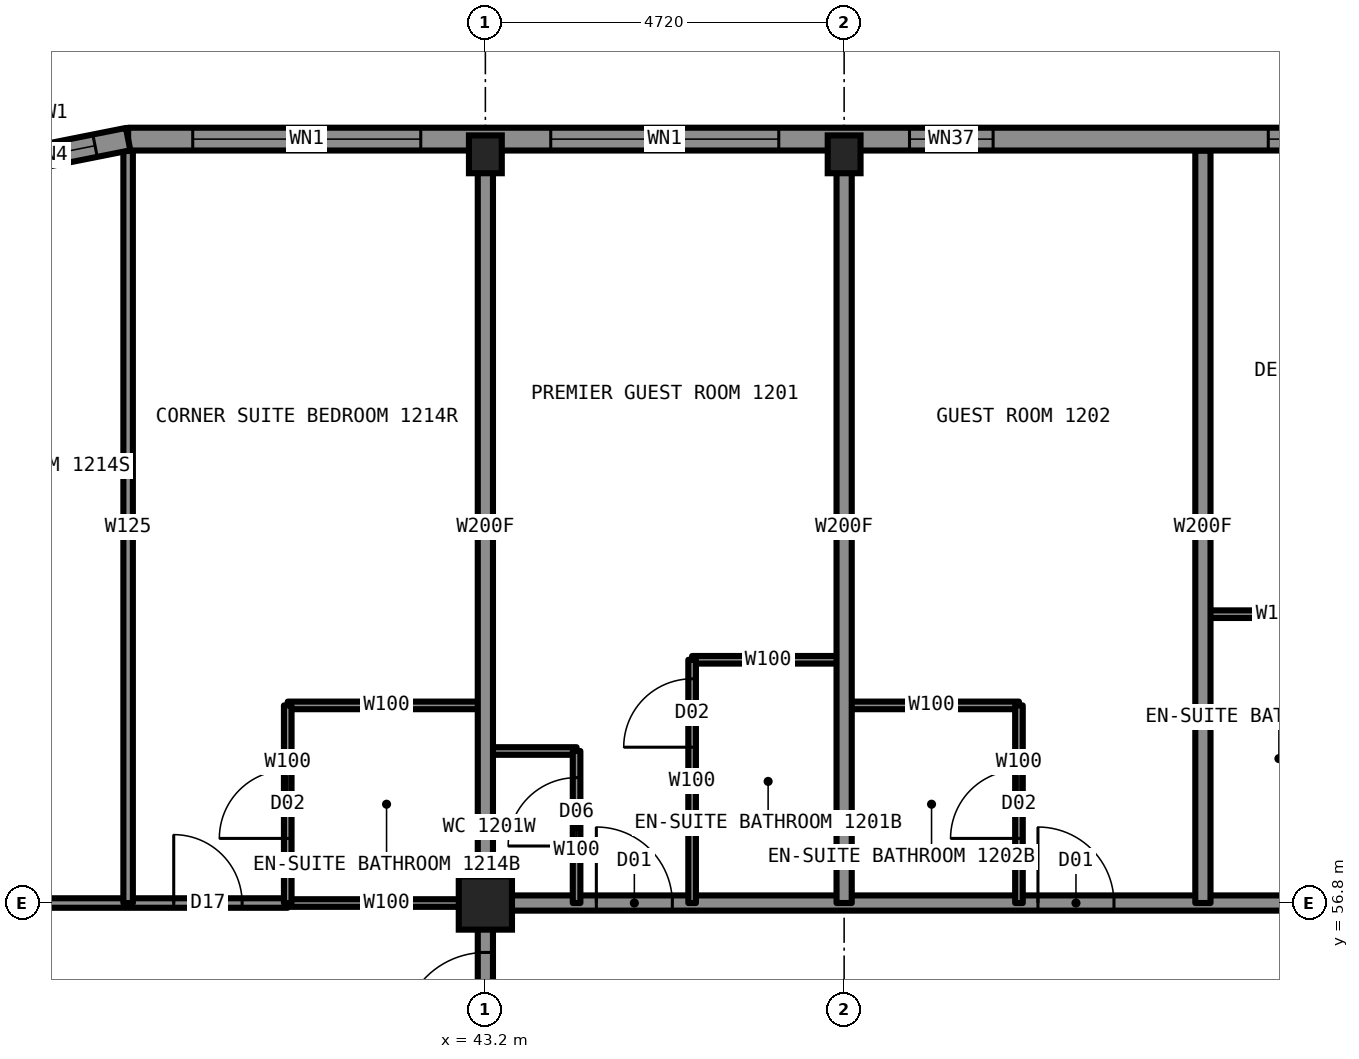
"""IFC4 building model, lengths in metres.
Left out: names, types, materials, properties, quantities, classifications, styles, units other than length and angle.
Written with IfcOpenShell. Run it as: python <this file> out.ifc"""

import sys

from ifc_helpers import new_model, si_unit, direction, frame, frame_2d, origin, origin_2d, place, context, subcontext, project, spatial, rectangle, hollow_rectangle, i_section, extrude, element, fill, save


model = new_model("IFC4")
c1 = context("Model", 3, precision=1e-05, world=origin(), true_north=direction((0.0, 1.0)))
c2 = subcontext(c1, "Body", "Model", "MODEL_VIEW")
j1 = project(units=[si_unit("LENGTHUNIT", "METRE"), si_unit("PLANEANGLEUNIT", "RADIAN")], contexts=[c1])
p1 = place(None, origin())
s1 = spatial("IfcSite", under=j1, at=p1, CompositionType="ELEMENT")
p2 = place(p1, origin())
s2 = spatial("IfcBuilding", under=s1, at=p2, CompositionType="ELEMENT")
p3 = place(p2, frame((0.0, 0.0, 49.5)))
s3 = spatial("IfcBuildingStorey", under=s2, at=p3, CompositionType="ELEMENT", Elevation=49.5)
for number, where, z_axis, x_axis in (
    (1, (43.2, 66.65, 0.0), (0.0, 0.0, 1.0), (1.0, 0.0, 0.0)),
    (2, (47.92, 66.65, 0.0), (0.0, 0.0, 1.0), (1.0, 0.0, 0.0)),
):
    element("IfcColumn", number, at=place(p3, frame(where, z_axis=z_axis, x_axis=x_axis)), inside=s3, PredefinedType="COLUMN", context=c2, shape_type="SweptSolid", body=[
        extrude(i_section(OverallWidth=0.432, OverallDepth=0.498, WebThickness=0.056, FlangeThickness=0.089, at=origin_2d()), origin(), (0.0, 0.0, 1.0), 3.5),
    ])
p4 = place(p3, frame((43.2, 56.8, 0.0), z_axis=(0.0, 0.0, 1.0), x_axis=(1.0, 0.0, 0.0)))
e3 = element("IfcColumn", 3, at=p4, inside=s3, PredefinedType="COLUMN", context=c2, shape_type="SweptSolid", body=[
    extrude(hollow_rectangle(XDim=0.7, YDim=0.7, WallThickness=0.06, at=origin_2d()), origin(), (0.0, 0.0, 1.0), 3.5),
])
p5 = place(p3, frame((40.6, 56.8, 0.0), z_axis=(0.0, 0.0, 1.0), x_axis=(1.0, 0.0, 0.0)))
e4 = element("IfcWall", 4, at=p5, inside=s3, PredefinedType="PARTITIONING", context=c2, shape_type="SweptSolid", body=[
    extrude(rectangle(XDim=2.6, YDim=0.1, at=frame_2d((1.3, 0.0))), origin(), (0.0, 0.0, 1.0), 2.573),
])
p6 = place(p3, frame((43.2, 56.8, 0.0), z_axis=(0.0, 0.0, 1.0), x_axis=(1.0, 0.0, 0.0)))
e5 = element("IfcWall", 5, at=p6, inside=s3, PredefinedType="PARTITIONING", context=c2, shape_type="SweptSolid", body=[
    extrude(rectangle(XDim=23.6, YDim=0.2, at=frame_2d((11.8, 0.0))), origin(), (0.0, 0.0, 1.0), 3.33),
])
p7 = place(p6, frame((1.46, 0.0, 0.0)))
e6 = element("IfcOpeningElement", 6, at=p7, cuts=e5, PredefinedType="OPENING", context=c2, shape_type="SweptSolid", body=[
    extrude(rectangle(XDim=1.0, YDim=2.2, at=frame_2d((0.5, 1.1))), frame((0.0, 0.11, 0.0), z_axis=(0.0, -1.0, 0.0), x_axis=(1.0, 0.0, 0.0)), (0.0, 0.0, 1.0), 0.22),
])
p8 = place(p6, frame((7.27, 0.0, 0.0)))
e7 = element("IfcOpeningElement", 7, at=p8, cuts=e5, PredefinedType="OPENING", context=c2, shape_type="SweptSolid", body=[
    extrude(rectangle(XDim=1.0, YDim=2.2, at=frame_2d((0.5, 1.1))), frame((0.0, 0.11, 0.0), z_axis=(0.0, -1.0, 0.0), x_axis=(1.0, 0.0, 0.0)), (0.0, 0.0, 1.0), 0.22),
])
p9 = place(p6, frame((11.7, 0.0, 0.0)))
e8 = element("IfcOpeningElement", 8, at=p9, cuts=e5, PredefinedType="OPENING", context=c2, shape_type="SweptSolid", body=[
    extrude(rectangle(XDim=1.0, YDim=2.2, at=frame_2d((0.5, 1.1))), frame((0.0, 0.11, 0.0), z_axis=(0.0, -1.0, 0.0), x_axis=(1.0, 0.0, 0.0)), (0.0, 0.0, 1.0), 0.22),
])
p10 = place(p6, frame((17.16, 0.0, 0.0)))
e9 = element("IfcOpeningElement", 9, at=p10, cuts=e5, PredefinedType="OPENING", context=c2, shape_type="SweptSolid", body=[
    extrude(rectangle(XDim=1.0, YDim=2.2, at=frame_2d((0.5, 1.1))), frame((0.0, 0.11, 0.0), z_axis=(0.0, -1.0, 0.0), x_axis=(1.0, 0.0, 0.0)), (0.0, 0.0, 1.0), 0.22),
])
p11 = place(p3, frame((33.3, 56.8, 0.0), z_axis=(0.0, 0.0, 1.0), x_axis=(1.0, 0.0, 0.0)))
e10 = element("IfcWall", 10, at=p11, inside=s3, PredefinedType="PARTITIONING", context=c2, shape_type="SweptSolid", body=[
    extrude(rectangle(XDim=7.3, YDim=0.125, at=frame_2d((3.65, 0.0))), origin(), (0.0, 0.0, 1.0), 2.573),
])
p12 = place(p11, frame((5.8, 0.0, 0.0)))
e11 = element("IfcOpeningElement", 11, at=p12, cuts=e10, PredefinedType="OPENING", context=c2, shape_type="SweptSolid", body=[
    extrude(rectangle(XDim=0.9, YDim=2.2, at=frame_2d((0.45, 1.1))), frame((0.0, 0.073, 0.0), z_axis=(0.0, -1.0, 0.0), x_axis=(1.0, 0.0, 0.0)), (0.0, 0.0, 1.0), 0.145),
])
p13 = place(p11, frame((2.0, 0.0, 0.0)))
e12 = element("IfcOpeningElement", 12, at=p13, cuts=e10, PredefinedType="OPENING", context=c2, shape_type="SweptSolid", body=[
    extrude(rectangle(XDim=0.9, YDim=2.2, at=frame_2d((0.45, 1.1))), frame((0.0, 0.073, 0.0), z_axis=(0.0, -1.0, 0.0), x_axis=(1.0, 0.0, 0.0)), (0.0, 0.0, 1.0), 0.145),
])
p14 = place(p3, frame((43.2, 58.8, 0.0), z_axis=(0.0, 0.0, 1.0), x_axis=(1.0, 0.0, 0.0)))
e13 = element("IfcWall", 13, at=p14, inside=s3, PredefinedType="PARTITIONING", context=c2, shape_type="SweptSolid", body=[
    extrude(rectangle(XDim=1.2, YDim=0.1, at=frame_2d((0.6, 0.0))), origin(), (0.0, 0.0, 1.0), 3.33),
])
p15 = place(p3, frame((40.6, 59.4, 0.0), z_axis=(0.0, 0.0, 1.0), x_axis=(1.0, 0.0, 0.0)))
e14 = element("IfcWall", 14, at=p15, inside=s3, PredefinedType="PARTITIONING", context=c2, shape_type="SweptSolid", body=[
    extrude(rectangle(XDim=2.6, YDim=0.1, at=frame_2d((1.3, 0.0))), origin(), (0.0, 0.0, 1.0), 3.33),
])
p16 = place(p3, frame((47.92, 59.4, 0.0), z_axis=(0.0, 0.0, 1.0), x_axis=(1.0, 0.0, 0.0)))
e15 = element("IfcWall", 15, at=p16, inside=s3, PredefinedType="PARTITIONING", context=c2, shape_type="SweptSolid", body=[
    extrude(rectangle(XDim=2.3, YDim=0.1, at=frame_2d((1.15, 0.0))), origin(), (0.0, 0.0, 1.0), 3.33),
])
for number, where, z_axis, x_axis in (
    (16, (45.92, 60.0, 0.0), (0.0, 0.0, 1.0), (1.0, 0.0, 0.0)),
    (17, (52.64, 60.6, 0.0), (0.0, 0.0, 1.0), (1.0, 0.0, 0.0)),
):
    element("IfcWall", number, at=place(p3, frame(where, z_axis=z_axis, x_axis=x_axis)), inside=s3, PredefinedType="PARTITIONING", context=c2, shape_type="SweptSolid", body=[
        extrude(rectangle(XDim=2.0, YDim=0.1, at=frame_2d((1.0, 0.0))), origin(), (0.0, 0.0, 1.0), 3.33),
    ])
p17 = place(p3, frame((44.4, 56.8, 0.0), z_axis=(0.0, 0.0, 1.0), x_axis=(0.0, 1.0, 0.0)))
e18 = element("IfcWall", 18, at=p17, inside=s3, PredefinedType="PARTITIONING", context=c2, shape_type="SweptSolid", body=[
    extrude(rectangle(XDim=2.0, YDim=0.1, at=frame_2d((1.0, 0.0))), origin(), (0.0, 0.0, 1.0), 3.33),
])
p18 = place(p17, frame((0.75, 0.0, 0.0)))
e19 = element("IfcOpeningElement", 19, at=p18, cuts=e18, PredefinedType="OPENING", context=c2, shape_type="SweptSolid", body=[
    extrude(rectangle(XDim=0.9, YDim=2.1, at=frame_2d((0.45, 1.05))), frame((0.0, 0.06, 0.0), z_axis=(0.0, -1.0, 0.0), x_axis=(1.0, 0.0, 0.0)), (0.0, 0.0, 1.0), 0.12),
])
p19 = place(p3, frame((43.2, 52.08, 0.0), z_axis=(0.0, 0.0, 1.0), x_axis=(0.0, 1.0, 0.0)))
e20 = element("IfcWall", 20, at=p19, inside=s3, PredefinedType="PARTITIONING", context=c2, shape_type="SweptSolid", body=[
    extrude(rectangle(XDim=4.72, YDim=0.2, at=frame_2d((2.36, 0.0))), origin(), (0.0, 0.0, 1.0), 3.33),
])
p20 = place(p19, frame((2.97, 0.0, 0.0)))
e21 = element("IfcOpeningElement", 21, at=p20, cuts=e20, PredefinedType="OPENING", context=c2, shape_type="SweptSolid", body=[
    extrude(rectangle(XDim=1.1, YDim=2.2, at=frame_2d((0.55, 1.1))), frame((0.0, 0.11, 0.0), z_axis=(0.0, -1.0, 0.0), x_axis=(1.0, 0.0, 0.0)), (0.0, 0.0, 1.0), 0.22),
])
p21 = place(p3, frame((43.2, 56.8, 0.0), z_axis=(0.0, 0.0, 1.0), x_axis=(0.0, 1.0, 0.0)))
e22 = element("IfcWall", 22, at=p21, inside=s3, PredefinedType="PARTITIONING", context=c2, shape_type="SweptSolid", body=[
    extrude(rectangle(XDim=9.9, YDim=0.2, at=frame_2d((4.95, 0.0))), origin(), (0.0, 0.0, 1.0), 2.573),
])
p22 = place(p3, frame((40.6, 56.8, 0.0), z_axis=(0.0, 0.0, 1.0), x_axis=(0.0, 1.0, 0.0)))
e23 = element("IfcWall", 23, at=p22, inside=s3, PredefinedType="PARTITIONING", context=c2, shape_type="SweptSolid", body=[
    extrude(rectangle(XDim=2.6, YDim=0.1, at=frame_2d((1.3, 0.0))), origin(), (0.0, 0.0, 1.0), 3.33),
])
p23 = place(p22, frame((0.85, 0.0, 0.0)))
e24 = element("IfcOpeningElement", 24, at=p23, cuts=e23, PredefinedType="OPENING", context=c2, shape_type="SweptSolid", body=[
    extrude(rectangle(XDim=0.9, YDim=2.1, at=frame_2d((0.45, 1.05))), frame((0.0, 0.06, 0.0), z_axis=(0.0, -1.0, 0.0), x_axis=(1.0, 0.0, 0.0)), (0.0, 0.0, 1.0), 0.12),
])
p24 = place(p3, frame((38.5, 56.8, 0.0), z_axis=(0.0, 0.0, 1.0), x_axis=(0.0, 1.0, 0.0)))
e25 = element("IfcWall", 25, at=p24, inside=s3, PredefinedType="PARTITIONING", context=c2, shape_type="SweptSolid", body=[
    extrude(rectangle(XDim=9.894, YDim=0.125, at=frame_2d((4.947, 0.0))), origin(), (0.0, 0.0, 1.0), 3.33),
])
p25 = place(p3, frame((52.64, 56.8, 0.0), z_axis=(0.0, 0.0, 1.0), x_axis=(0.0, 1.0, 0.0)))
e26 = element("IfcWall", 26, at=p25, inside=s3, PredefinedType="PARTITIONING", context=c2, shape_type="SweptSolid", body=[
    extrude(rectangle(XDim=9.9, YDim=0.2, at=frame_2d((4.95, 0.0))), origin(), (0.0, 0.0, 1.0), 3.33),
])
p26 = place(p3, frame((50.22, 56.8, 0.0), z_axis=(0.0, 0.0, 1.0), x_axis=(0.0, 1.0, 0.0)))
e27 = element("IfcWall", 27, at=p26, inside=s3, PredefinedType="PARTITIONING", context=c2, shape_type="SweptSolid", body=[
    extrude(rectangle(XDim=2.6, YDim=0.1, at=frame_2d((1.3, 0.0))), origin(), (0.0, 0.0, 1.0), 3.33),
])
p27 = place(p26, frame((0.85, 0.0, 0.0)))
e28 = element("IfcOpeningElement", 28, at=p27, cuts=e27, PredefinedType="OPENING", context=c2, shape_type="SweptSolid", body=[
    extrude(rectangle(XDim=0.9, YDim=2.1, at=frame_2d((0.45, 1.05))), frame((0.0, 0.06, 0.0), z_axis=(0.0, -1.0, 0.0), x_axis=(1.0, 0.0, 0.0)), (0.0, 0.0, 1.0), 0.12),
])
p28 = place(p3, frame((47.92, 56.8, 0.0), z_axis=(0.0, 0.0, 1.0), x_axis=(0.0, 1.0, 0.0)))
e29 = element("IfcWall", 29, at=p28, inside=s3, PredefinedType="PARTITIONING", context=c2, shape_type="SweptSolid", body=[
    extrude(rectangle(XDim=9.9, YDim=0.2, at=frame_2d((4.95, 0.0))), origin(), (0.0, 0.0, 1.0), 2.573),
])
p29 = place(p3, frame((45.92, 56.8, 0.0), z_axis=(0.0, 0.0, 1.0), x_axis=(0.0, 1.0, 0.0)))
e30 = element("IfcWall", 30, at=p29, inside=s3, PredefinedType="PARTITIONING", context=c2, shape_type="SweptSolid", body=[
    extrude(rectangle(XDim=3.2, YDim=0.1, at=frame_2d((1.6, 0.0))), origin(), (0.0, 0.0, 1.0), 3.33),
])
p30 = place(p29, frame((2.05, 0.0, 0.0)))
e31 = element("IfcOpeningElement", 31, at=p30, cuts=e30, PredefinedType="OPENING", context=c2, shape_type="SweptSolid", body=[
    extrude(rectangle(XDim=0.9, YDim=2.1, at=frame_2d((0.45, 1.05))), frame((0.0, 0.06, 0.0), z_axis=(0.0, -1.0, 0.0), x_axis=(1.0, 0.0, 0.0)), (0.0, 0.0, 1.0), 0.12),
])
p31 = place(p3, frame((71.5, 66.85, 0.0), z_axis=(0.0, 0.0, 1.0), x_axis=(-1.0, 0.0, 0.0)))
e32 = element("IfcWall", 32, at=p31, inside=s3, PredefinedType="SOLIDWALL", context=c2, shape_type="SweptSolid", body=[
    extrude(rectangle(XDim=33.0, YDim=0.3, at=frame_2d((16.5, 0.0))), origin(), (0.0, 0.0, 1.0), 2.83),
])
p32 = place(p31, frame((0.85, 0.0, 0.5)))
e33 = element("IfcOpeningElement", 33, at=p32, cuts=e32, PredefinedType="OPENING", context=c2, shape_type="SweptSolid", body=[
    extrude(rectangle(XDim=3.0, YDim=2.0, at=frame_2d((1.5, 1.0))), frame((0.0, 0.16, 0.0), z_axis=(0.0, -1.0, 0.0), x_axis=(1.0, 0.0, 0.0)), (0.0, 0.0, 1.0), 0.32),
])
p33 = place(p31, frame((5.56, 0.0, 0.5)))
e34 = element("IfcOpeningElement", 34, at=p33, cuts=e32, PredefinedType="OPENING", context=c2, shape_type="SweptSolid", body=[
    extrude(rectangle(XDim=3.0, YDim=2.0, at=frame_2d((1.5, 1.0))), frame((0.0, 0.16, 0.0), z_axis=(0.0, -1.0, 0.0), x_axis=(1.0, 0.0, 0.0)), (0.0, 0.0, 1.0), 0.32),
])
p34 = place(p31, frame((10.28, 0.0, 1.1)))
e35 = element("IfcOpeningElement", 35, at=p34, cuts=e32, PredefinedType="OPENING", context=c2, shape_type="SweptSolid", body=[
    extrude(rectangle(XDim=1.1, YDim=1.4, at=frame_2d((0.55, 0.7))), frame((0.0, 0.16, 0.0), z_axis=(0.0, -1.0, 0.0), x_axis=(1.0, 0.0, 0.0)), (0.0, 0.0, 1.0), 0.32),
])
p35 = place(p31, frame((15.0, 0.0, 0.5)))
e36 = element("IfcOpeningElement", 36, at=p35, cuts=e32, PredefinedType="OPENING", context=c2, shape_type="SweptSolid", body=[
    extrude(rectangle(XDim=3.0, YDim=2.0, at=frame_2d((1.5, 1.0))), frame((0.0, 0.16, 0.0), z_axis=(0.0, -1.0, 0.0), x_axis=(1.0, 0.0, 0.0)), (0.0, 0.0, 1.0), 0.32),
])
p36 = place(p31, frame((21.62, 0.0, 1.1)))
e37 = element("IfcOpeningElement", 37, at=p36, cuts=e32, PredefinedType="OPENING", context=c2, shape_type="SweptSolid", body=[
    extrude(rectangle(XDim=1.1, YDim=1.4, at=frame_2d((0.55, 0.7))), frame((0.0, 0.16, 0.0), z_axis=(0.0, -1.0, 0.0), x_axis=(1.0, 0.0, 0.0)), (0.0, 0.0, 1.0), 0.32),
])
p37 = place(p31, frame((24.44, 0.0, 0.5)))
e38 = element("IfcOpeningElement", 38, at=p37, cuts=e32, PredefinedType="OPENING", context=c2, shape_type="SweptSolid", body=[
    extrude(rectangle(XDim=3.0, YDim=2.0, at=frame_2d((1.5, 1.0))), frame((0.0, 0.16, 0.0), z_axis=(0.0, -1.0, 0.0), x_axis=(1.0, 0.0, 0.0)), (0.0, 0.0, 1.0), 0.32),
])
p38 = place(p31, frame((29.15, 0.0, 0.5)))
e39 = element("IfcOpeningElement", 39, at=p38, cuts=e32, PredefinedType="OPENING", context=c2, shape_type="SweptSolid", body=[
    extrude(rectangle(XDim=3.0, YDim=2.0, at=frame_2d((1.5, 1.0))), frame((0.0, 0.16, 0.0), z_axis=(0.0, -1.0, 0.0), x_axis=(1.0, 0.0, 0.0)), (0.0, 0.0, 1.0), 0.32),
])
p39 = place(p3, frame((38.5, 66.85, 0.0), z_axis=(0.0, 0.0, 1.0), x_axis=(-0.980787050784, -0.195081421501, 0.0)))
e40 = element("IfcWall", 40, at=p39, inside=s3, PredefinedType="SOLIDWALL", context=c2, shape_type="SweptSolid", body=[
    extrude(rectangle(XDim=2.087, YDim=0.3, at=frame_2d((1.044, 0.0))), origin(), (0.0, 0.0, 1.0), 3.33),
])
p40 = place(p39, frame((0.444, 0.0, 0.5)))
e41 = element("IfcOpeningElement", 41, at=p40, cuts=e40, PredefinedType="OPENING", context=c2, shape_type="SweptSolid", body=[
    extrude(rectangle(XDim=1.2, YDim=2.0, at=frame_2d((0.6, 1.0))), frame((0.0, 0.16, 0.0), z_axis=(0.0, -1.0, 0.0), x_axis=(1.0, 0.0, 0.0)), (0.0, 0.0, 1.0), 0.32),
])
p41 = place(p7, origin())
e42 = element("IfcDoor", 42, at=p41, inside=s3, OperationType="SINGLE_SWING_LEFT", PredefinedType="DOOR", context=c2, shape_type="SweptSolid", body=[
    extrude(rectangle(XDim=1.0, YDim=2.2, at=frame_2d((0.5, 1.1))), frame((0.0, 0.025, 0.0), z_axis=(0.0, -1.0, 0.0), x_axis=(1.0, 0.0, 0.0)), (0.0, 0.0, 1.0), 0.05),
])
fill(e6, e42)
p42 = place(p30, origin())
e43 = element("IfcDoor", 43, at=p42, inside=s3, OperationType="SINGLE_SWING_RIGHT", PredefinedType="DOOR", context=c2, shape_type="SweptSolid", body=[
    extrude(rectangle(XDim=0.9, YDim=2.1, at=frame_2d((0.45, 1.05))), frame((0.0, 0.025, 0.0), z_axis=(0.0, -1.0, 0.0), x_axis=(1.0, 0.0, 0.0)), (0.0, 0.0, 1.0), 0.05),
])
fill(e31, e43)
p43 = place(p18, origin())
e44 = element("IfcDoor", 44, at=p43, inside=s3, OperationType="SINGLE_SWING_LEFT", PredefinedType="DOOR", context=c2, shape_type="SweptSolid", body=[
    extrude(rectangle(XDim=0.9, YDim=2.1, at=frame_2d((0.45, 1.05))), frame((0.0, 0.025, 0.0), z_axis=(0.0, -1.0, 0.0), x_axis=(1.0, 0.0, 0.0)), (0.0, 0.0, 1.0), 0.05),
])
fill(e19, e44)
p44 = place(p8, origin())
e45 = element("IfcDoor", 45, at=p44, inside=s3, OperationType="SINGLE_SWING_LEFT", PredefinedType="DOOR", context=c2, shape_type="SweptSolid", body=[
    extrude(rectangle(XDim=1.0, YDim=2.2, at=frame_2d((0.5, 1.1))), frame((0.0, 0.025, 0.0), z_axis=(0.0, -1.0, 0.0), x_axis=(1.0, 0.0, 0.0)), (0.0, 0.0, 1.0), 0.05),
])
fill(e7, e45)
p45 = place(p27, origin())
e46 = element("IfcDoor", 46, at=p45, inside=s3, OperationType="SINGLE_SWING_RIGHT", PredefinedType="DOOR", context=c2, shape_type="SweptSolid", body=[
    extrude(rectangle(XDim=0.9, YDim=2.1, at=frame_2d((0.45, 1.05))), frame((0.0, 0.025, 0.0), z_axis=(0.0, -1.0, 0.0), x_axis=(1.0, 0.0, 0.0)), (0.0, 0.0, 1.0), 0.05),
])
fill(e28, e46)
p46 = place(p20, origin())
e47 = element("IfcDoor", 47, at=p46, inside=s3, OperationType="SINGLE_SWING_LEFT", PredefinedType="DOOR", context=c2, shape_type="SweptSolid", body=[
    extrude(rectangle(XDim=1.1, YDim=2.2, at=frame_2d((0.55, 1.1))), frame((0.0, 0.025, 0.0), z_axis=(0.0, -1.0, 0.0), x_axis=(1.0, 0.0, 0.0)), (0.0, 0.0, 1.0), 0.05),
])
fill(e21, e47)
p47 = place(p23, origin())
e48 = element("IfcDoor", 48, at=p47, inside=s3, OperationType="SINGLE_SWING_RIGHT", PredefinedType="DOOR", context=c2, shape_type="SweptSolid", body=[
    extrude(rectangle(XDim=0.9, YDim=2.1, at=frame_2d((0.45, 1.05))), frame((0.0, 0.025, 0.0), z_axis=(0.0, -1.0, 0.0), x_axis=(1.0, 0.0, 0.0)), (0.0, 0.0, 1.0), 0.05),
])
fill(e24, e48)
p48 = place(p12, origin())
e49 = element("IfcDoor", 49, at=p48, inside=s3, OperationType="SINGLE_SWING_LEFT", PredefinedType="DOOR", context=c2, shape_type="SweptSolid", body=[
    extrude(rectangle(XDim=0.9, YDim=2.2, at=frame_2d((0.45, 1.1))), frame((0.0, 0.025, 0.0), z_axis=(0.0, -1.0, 0.0), x_axis=(1.0, 0.0, 0.0)), (0.0, 0.0, 1.0), 0.05),
])
fill(e11, e49)
p49 = place(p35, origin())
e50 = element("IfcWindow", 50, at=p49, inside=s3, PartitioningType="SINGLE_PANEL", PredefinedType="WINDOW", context=c2, shape_type="SweptSolid", body=[
    extrude(rectangle(XDim=3.0, YDim=2.0, at=frame_2d((1.5, 1.0))), frame((0.0, 0.03, 0.0), z_axis=(0.0, -1.0, 0.0), x_axis=(1.0, 0.0, 0.0)), (0.0, 0.0, 1.0), 0.06),
])
fill(e36, e50)
p50 = place(p36, origin())
e51 = element("IfcWindow", 51, at=p50, inside=s3, PartitioningType="SINGLE_PANEL", PredefinedType="WINDOW", context=c2, shape_type="SweptSolid", body=[
    extrude(rectangle(XDim=1.1, YDim=1.4, at=frame_2d((0.55, 0.7))), frame((0.0, 0.03, 0.0), z_axis=(0.0, -1.0, 0.0), x_axis=(1.0, 0.0, 0.0)), (0.0, 0.0, 1.0), 0.06),
])
fill(e37, e51)
p51 = place(p37, origin())
e52 = element("IfcWindow", 52, at=p51, inside=s3, PartitioningType="SINGLE_PANEL", PredefinedType="WINDOW", context=c2, shape_type="SweptSolid", body=[
    extrude(rectangle(XDim=3.0, YDim=2.0, at=frame_2d((1.5, 1.0))), frame((0.0, 0.03, 0.0), z_axis=(0.0, -1.0, 0.0), x_axis=(1.0, 0.0, 0.0)), (0.0, 0.0, 1.0), 0.06),
])
fill(e38, e52)
p52 = place(p38, origin())
e53 = element("IfcWindow", 53, at=p52, inside=s3, PartitioningType="SINGLE_PANEL", PredefinedType="WINDOW", context=c2, shape_type="SweptSolid", body=[
    extrude(rectangle(XDim=3.0, YDim=2.0, at=frame_2d((1.5, 1.0))), frame((0.0, 0.03, 0.0), z_axis=(0.0, -1.0, 0.0), x_axis=(1.0, 0.0, 0.0)), (0.0, 0.0, 1.0), 0.06),
])
fill(e39, e53)
p53 = place(p40, origin())
e54 = element("IfcWindow", 54, at=p53, inside=s3, PartitioningType="SINGLE_PANEL", PredefinedType="WINDOW", context=c2, shape_type="SweptSolid", body=[
    extrude(rectangle(XDim=1.2, YDim=2.0, at=frame_2d((0.6, 1.0))), frame((0.0, 0.03, 0.0), z_axis=(0.0, -1.0, 0.0), x_axis=(1.0, 0.0, 0.0)), (0.0, 0.0, 1.0), 0.06),
])
fill(e41, e54)
save(model, sys.argv[1])
